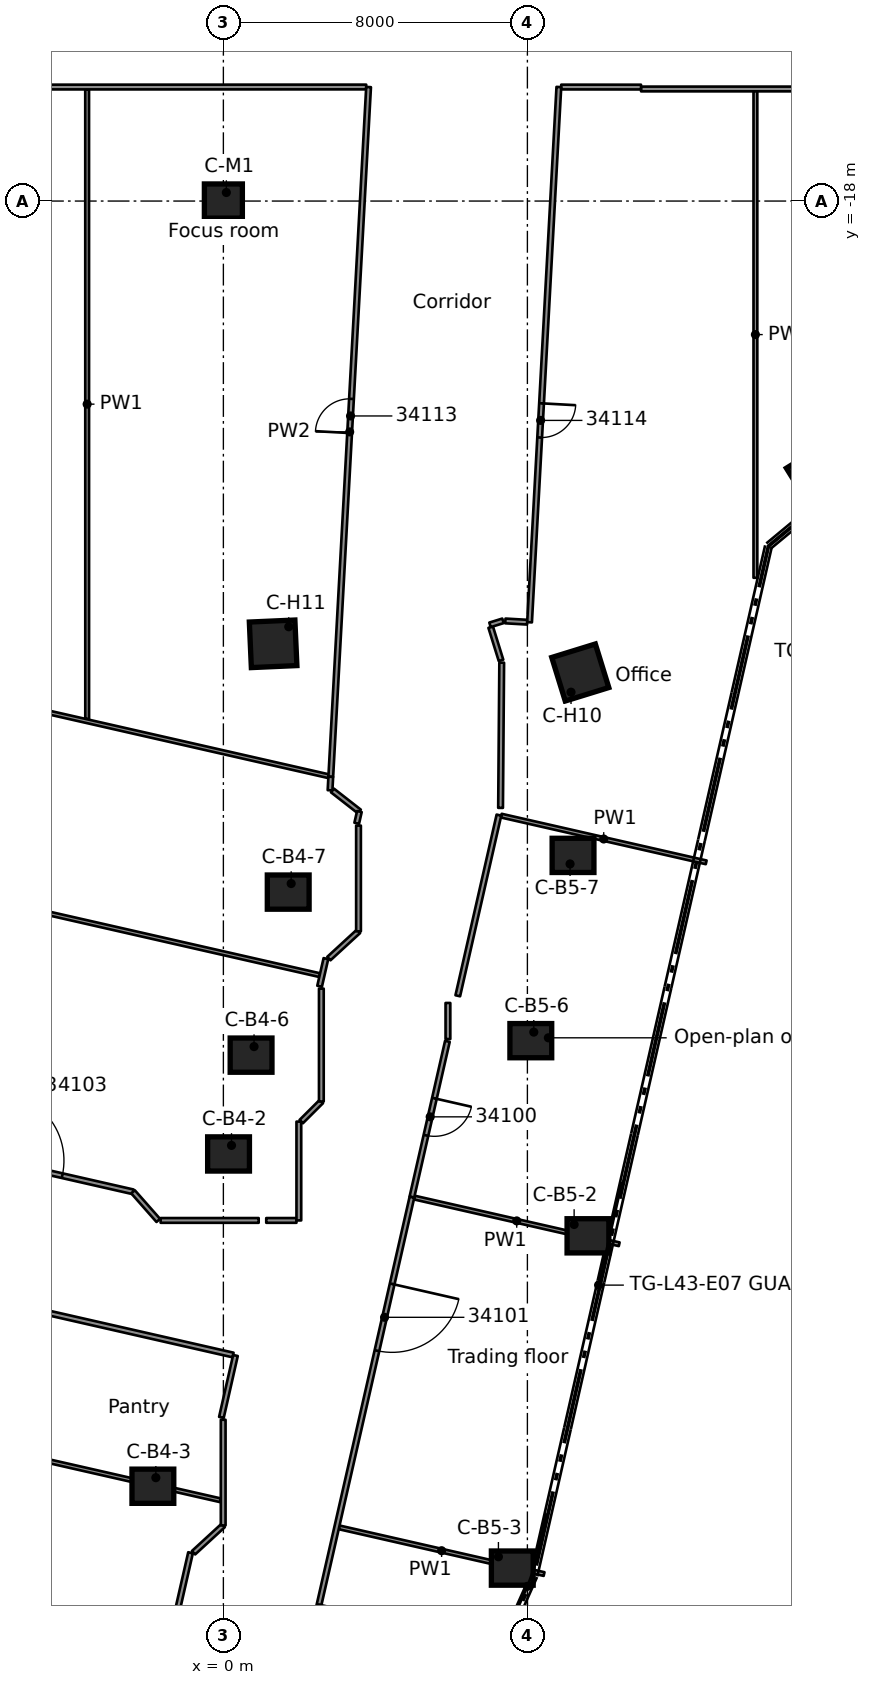
"""IFC4 building model, lengths in metres.
Left out: names, types, materials, properties, quantities, classifications, styles, units other than length and angle.
Written with IfcOpenShell. Run it as: python <this file> out.ifc"""

import sys

from ifc_helpers import new_model, si_unit, direction, frame, frame_2d, origin, origin_2d, place, context, subcontext, project, spatial, rectangle, extrude, element, fill, save


model = new_model("IFC4")
c1 = context("Model", 3, precision=1e-05, world=origin(), true_north=direction((0.0, 1.0)))
c2 = subcontext(c1, "Body", "Model", "MODEL_VIEW")
j1 = project(units=[si_unit("LENGTHUNIT", "METRE"), si_unit("PLANEANGLEUNIT", "RADIAN")], contexts=[c1])
p1 = place(None, origin())
s1 = spatial("IfcSite", under=j1, at=p1, CompositionType="ELEMENT")
p2 = place(p1, origin())
s2 = spatial("IfcBuilding", under=s1, at=p2, CompositionType="ELEMENT")
p3 = place(p2, frame((0.0, 0.0, 167.1)))
s3 = spatial("IfcBuildingStorey", under=s2, at=p3, CompositionType="ELEMENT", Elevation=167.1)
for number, where, z_axis, x_axis in (
    (1, (0.136, -43.073, 0.0), (0.0, 0.0, 1.0), (1.0, 0.0, 0.0)),
    (2, (-1.855, -51.816, 0.0), (0.0, 0.0, 1.0), (1.0, 0.0, 0.0)),
    (3, (0.729, -40.473, 0.0), (0.0, 0.0, 1.0), (1.0, 0.0, 0.0)),
    (4, (1.706, -36.183, 0.0), (0.0, 0.0, 1.0), (1.0, 0.0, 0.0)),
    (5, (9.594, -45.227, 0.0), (0.0, 0.0, 1.0), (1.0, 0.0, 0.0)),
    (6, (7.602, -53.97, 0.0), (0.0, 0.0, 1.0), (1.0, 0.0, 0.0)),
    (7, (8.09, -40.092, 0.0), (0.0, 0.0, 1.0), (1.0, 0.0, 0.0)),
    (8, (9.201, -35.217, 0.0), (0.0, 0.0, 1.0), (1.0, 0.0, 0.0)),
):
    element("IfcColumn", number, at=place(p3, frame(where, z_axis=z_axis, x_axis=x_axis)), inside=s3, PredefinedType="COLUMN", context=c2, shape_type="SweptSolid", body=[
        extrude(rectangle(XDim=1.1, YDim=0.9, at=origin_2d()), origin(), (0.0, 0.0, 1.0), 3.5),
    ])
for number, where, z_axis, x_axis in (
    (9, (15.642, -25.222, 0.0), (0.0, 0.0, 1.0), (0.527, -0.85, 0.0)),
    (10, (9.392, -30.405, 0.0), (0.0, 0.0, 1.0), (0.295, -0.955, 0.0)),
    (11, (1.309, -29.65, 0.0), (0.0, 0.0, 1.0), (0.044, -0.999, 0.0)),
):
    element("IfcColumn", number, at=place(p3, frame(where, z_axis=z_axis, x_axis=x_axis)), inside=s3, PredefinedType="COLUMN", context=c2, shape_type="SweptSolid", body=[
        extrude(rectangle(XDim=1.2, YDim=1.2, at=origin_2d()), origin(), (0.0, 0.0, 1.0), 3.5),
    ])
p4 = place(p3, frame((0.0, -18.0, 0.0), z_axis=(0.0, 0.0, 1.0), x_axis=(1.0, 0.0, 0.0)))
e12 = element("IfcColumn", 12, at=p4, inside=s3, PredefinedType="COLUMN", context=c2, shape_type="SweptSolid", body=[
    extrude(rectangle(XDim=1.0, YDim=0.9, at=origin_2d()), origin(), (0.0, 0.0, 1.0), 3.5),
])
p5 = place(p3, frame((-3.585, -15.062, 0.0), z_axis=(0.0, 0.0, 1.0), x_axis=(5.895705e-05, -0.999999998262, 0.0)))
e13 = element("IfcWall", 13, at=p5, inside=s3, PredefinedType="PARTITIONING", context=c2, shape_type="SweptSolid", body=[
    extrude(rectangle(XDim=16.564, YDim=0.1, at=frame_2d((8.282, 0.0))), origin(), (0.0, 0.0, 1.0), 3.06),
])
p6 = place(p3, frame((7.034, -29.211, 0.0), z_axis=(0.0, 0.0, 1.0), x_axis=(0.29681821376, -0.954934001898, 0.0)))
e14 = element("IfcWall", 14, at=p6, inside=s3, PredefinedType="PARTITIONING", context=c2, shape_type="SweptSolid", body=[
    extrude(rectangle(XDim=0.916, YDim=0.125, at=frame_2d((0.458, 0.0))), origin(), (0.0, 0.0, 1.0), 3.06),
])
p7 = place(p3, frame((-23.487, -46.854, 0.0), z_axis=(0.0, 0.0, 1.0), x_axis=(0.975033161008, -0.222059304997, 0.0)))
e15 = element("IfcWall", 15, at=p7, inside=s3, PredefinedType="PARTITIONING", context=c2, shape_type="SweptSolid", body=[
    extrude(rectangle(XDim=24.007, YDim=0.1, at=frame_2d((12.004, 0.0))), origin(), (0.0, 0.0, 1.0), 3.06),
])
p8 = place(p3, frame((3.046, -52.898, 0.0), z_axis=(0.0, 0.0, 1.0), x_axis=(0.975003485187, -0.222189567426, 0.0)))
e16 = element("IfcWall", 16, at=p8, inside=s3, PredefinedType="PARTITIONING", context=c2, shape_type="SweptSolid", body=[
    extrude(rectangle(XDim=5.531, YDim=0.1, at=frame_2d((2.766, 0.0))), origin(), (0.0, 0.0, 1.0), 3.06),
])
p9 = place(p3, frame((0.255, -48.363, 0.0), z_axis=(0.0, 0.0, 1.0), x_axis=(-0.975011387461, 0.222154888135, 0.0)))
e17 = element("IfcWall", 17, at=p9, inside=s3, PredefinedType="PARTITIONING", context=c2, shape_type="SweptSolid", body=[
    extrude(rectangle(XDim=23.484, YDim=0.125, at=frame_2d((11.742, 0.0))), origin(), (0.0, 0.0, 1.0), 3.06),
])
p10 = place(p9, frame((6.036, 0.0, 0.0)))
e18 = element("IfcOpeningElement", 18, at=p10, cuts=e17, PredefinedType="OPENING", context=c2, shape_type="SweptSolid", body=[
    extrude(rectangle(XDim=0.9, YDim=2.1, at=frame_2d((0.45, 1.05))), frame((0.0, 0.073, 0.0), z_axis=(0.0, -1.0, 0.0), x_axis=(1.0, 0.0, 0.0)), (0.0, 0.0, 1.0), 0.145),
])
p11 = place(p9, frame((15.494, 0.0, 0.0)))
e19 = element("IfcOpeningElement", 19, at=p11, cuts=e17, PredefinedType="OPENING", context=c2, shape_type="SweptSolid", body=[
    extrude(rectangle(XDim=1.1, YDim=2.1, at=frame_2d((0.55, 1.05))), frame((0.0, 0.073, 0.0), z_axis=(0.0, -1.0, 0.0), x_axis=(1.0, 0.0, 0.0)), (0.0, 0.0, 1.0), 0.145),
])
p12 = place(p3, frame((-8.469, -42.682, 0.0), z_axis=(0.0, 0.0, 1.0), x_axis=(0.975041034041, -0.222024732714, 0.0)))
e20 = element("IfcWall", 20, at=p12, inside=s3, PredefinedType="PARTITIONING", context=c2, shape_type="SweptSolid", body=[
    extrude(rectangle(XDim=6.248, YDim=0.125, at=frame_2d((3.124, 0.0))), origin(), (0.0, 0.0, 1.0), 3.06),
])
p13 = place(p12, frame((2.538, 0.0, 0.0)))
e21 = element("IfcOpeningElement", 21, at=p13, cuts=e20, PredefinedType="OPENING", context=c2, shape_type="SweptSolid", body=[
    extrude(rectangle(XDim=1.8, YDim=2.1, at=frame_2d((0.9, 1.05))), frame((0.0, 0.073, 0.0), z_axis=(0.0, -1.0, 0.0), x_axis=(1.0, 0.0, 0.0)), (0.0, 0.0, 1.0), 0.145),
])
p14 = place(p3, frame((5.022, -44.22, 0.0), z_axis=(0.0, 0.0, 1.0), x_axis=(0.975012198948, -0.222151326582, 0.0)))
e22 = element("IfcWall", 22, at=p14, inside=s3, PredefinedType="PARTITIONING", context=c2, shape_type="SweptSolid", body=[
    extrude(rectangle(XDim=5.532, YDim=0.1, at=frame_2d((2.766, 0.0))), origin(), (0.0, 0.0, 1.0), 3.06),
])
p15 = place(p3, frame((-20.366, -33.152, 0.0), z_axis=(0.0, 0.0, 1.0), x_axis=(0.975030849226, -0.222069455479, 0.0)))
e23 = element("IfcWall", 23, at=p15, inside=s3, PredefinedType="PARTITIONING", context=c2, shape_type="SweptSolid", body=[
    extrude(rectangle(XDim=23.487, YDim=0.1, at=frame_2d((11.744, 0.0))), origin(), (0.0, 0.0, 1.0), 3.06),
])
p16 = place(p3, frame((-19.221, -28.127, 0.0), z_axis=(0.0, 0.0, 1.0), x_axis=(0.975047400712, -0.22199677107, 0.0)))
e24 = element("IfcWall", 24, at=p16, inside=s3, PredefinedType="PARTITIONING", context=c2, shape_type="SweptSolid", body=[
    extrude(rectangle(XDim=22.555, YDim=0.1, at=frame_2d((11.277, 0.0))), origin(), (0.0, 0.0, 1.0), 3.06),
])
p17 = place(p3, frame((7.312, -34.171, 0.0), z_axis=(0.0, 0.0, 1.0), x_axis=(0.975003485187, -0.222189567426, 0.0)))
e25 = element("IfcWall", 25, at=p17, inside=s3, PredefinedType="PARTITIONING", context=c2, shape_type="SweptSolid", body=[
    extrude(rectangle(XDim=5.531, YDim=0.1, at=frame_2d((2.766, 0.0))), origin(), (0.0, 0.0, 1.0), 3.06),
])
p18 = place(p3, frame((7.42, -29.048, 0.0), z_axis=(0.0, 0.0, 1.0), x_axis=(0.998362357427, -0.057206671584, 0.0)))
e26 = element("IfcWall", 26, at=p18, inside=s3, PredefinedType="PARTITIONING", context=c2, shape_type="SweptSolid", body=[
    extrude(rectangle(XDim=0.576, YDim=0.125, at=frame_2d((0.288, 0.0))), origin(), (0.0, 0.0, 1.0), 3.06),
])
p19 = place(p3, frame((2.869, -33.508, 0.0), z_axis=(0.0, 0.0, 1.0), x_axis=(0.787979198173, -0.615701862306, 0.0)))
e27 = element("IfcWall", 27, at=p19, inside=s3, PredefinedType="PARTITIONING", context=c2, shape_type="SweptSolid", body=[
    extrude(rectangle(XDim=0.901, YDim=0.125, at=frame_2d((0.451, 0.0))), origin(), (0.0, 0.0, 1.0), 3.06),
])
p20 = place(p3, frame((-0.785, -53.565, 0.0), z_axis=(0.0, 0.0, 1.0), x_axis=(0.736206501859, 0.676756962742, 0.0)))
e28 = element("IfcWall", 28, at=p20, inside=s3, PredefinedType="PARTITIONING", context=c2, shape_type="SweptSolid", body=[
    extrude(rectangle(XDim=1.06, YDim=0.125, at=frame_2d((0.53, 0.0))), origin(), (0.0, 0.0, 1.0), 3.06),
])
p21 = place(p3, frame((-1.651, -44.822, 0.0), z_axis=(0.0, 0.0, 1.0), x_axis=(1.0, 0.0, 0.0)))
e29 = element("IfcWall", 29, at=p21, inside=s3, PredefinedType="PARTITIONING", context=c2, shape_type="SweptSolid", body=[
    extrude(rectangle(XDim=2.58, YDim=0.125, at=frame_2d((1.29, 0.0))), origin(), (0.0, 0.0, 1.0), 3.06),
])
p22 = place(p3, frame((1.128, -44.822, 0.0), z_axis=(0.0, 0.0, 1.0), x_axis=(1.0, 0.0, 0.0)))
e30 = element("IfcWall", 30, at=p22, inside=s3, PredefinedType="PARTITIONING", context=c2, shape_type="SweptSolid", body=[
    extrude(rectangle(XDim=0.795, YDim=0.125, at=frame_2d((0.397, 0.0))), origin(), (0.0, 0.0, 1.0), 3.06),
])
p23 = place(p3, frame((2.048, -42.222, 0.0), z_axis=(0.0, 0.0, 1.0), x_axis=(0.707758792556, 0.706454168053, 0.0)))
e31 = element("IfcWall", 31, at=p23, inside=s3, PredefinedType="PARTITIONING", context=c2, shape_type="SweptSolid", body=[
    extrude(rectangle(XDim=0.749, YDim=0.125, at=frame_2d((0.374, 0.0))), origin(), (0.0, 0.0, 1.0), 3.06),
])
p24 = place(p3, frame((2.776, -37.932, 0.0), z_axis=(0.0, 0.0, 1.0), x_axis=(0.736321314263, 0.676632043404, 0.0)))
e32 = element("IfcWall", 32, at=p24, inside=s3, PredefinedType="PARTITIONING", context=c2, shape_type="SweptSolid", body=[
    extrude(rectangle(XDim=1.059, YDim=0.125, at=frame_2d((0.53, 0.0))), origin(), (0.0, 0.0, 1.0), 3.06),
])
p25 = place(p3, frame((21.988, -15.051, 0.0), z_axis=(0.0, 0.0, 1.0), x_axis=(-1.0, 0.0, 0.0)))
e33 = element("IfcWall", 33, at=p25, inside=s3, PredefinedType="PARTITIONING", context=c2, shape_type="SweptSolid", body=[
    extrude(rectangle(XDim=10.997, YDim=0.125, at=frame_2d((5.499, 0.0))), origin(), (0.0, 0.0, 1.0), 3.06),
])
p26 = place(p25, frame((3.538, 0.0, 0.0)))
e34 = element("IfcOpeningElement", 34, at=p26, cuts=e33, PredefinedType="OPENING", context=c2, shape_type="SweptSolid", body=[
    extrude(rectangle(XDim=0.9, YDim=2.1, at=frame_2d((0.45, 1.05))), frame((0.0, 0.073, 0.0), z_axis=(0.0, -1.0, 0.0), x_axis=(1.0, 0.0, 0.0)), (0.0, 0.0, 1.0), 0.145),
])
p27 = place(p3, frame((-10.99, -15.001, 0.0), z_axis=(0.0, 0.0, 1.0), x_axis=(0.999999991232, 0.000132424021, 0.0)))
e35 = element("IfcWall", 35, at=p27, inside=s3, PredefinedType="PARTITIONING", context=c2, shape_type="SweptSolid", body=[
    extrude(rectangle(XDim=14.749, YDim=0.125, at=frame_2d((7.375, 0.0))), origin(), (0.0, 0.0, 1.0), 3.06),
])
p28 = place(p3, frame((8.89, -15.0, 0.0), z_axis=(0.0, 0.0, 1.0), x_axis=(0.999999891884, -0.000465008087, 0.0)))
e36 = element("IfcWall", 36, at=p28, inside=s3, PredefinedType="PARTITIONING", context=c2, shape_type="SweptSolid", body=[
    extrude(rectangle(XDim=2.1, YDim=0.125, at=frame_2d((1.05, 0.0))), origin(), (0.0, 0.0, 1.0), 3.06),
])
p29 = place(p3, frame((7.016, -29.151, 0.0), z_axis=(0.0, 0.0, 1.0), x_axis=(0.955157326174, 0.296098771114, 0.0)))
e37 = element("IfcWall", 37, at=p29, inside=s3, PredefinedType="PARTITIONING", context=c2, shape_type="SweptSolid", body=[
    extrude(rectangle(XDim=0.358, YDim=0.125, at=frame_2d((0.179, 0.0))), origin(), (0.0, 0.0, 1.0), 3.06),
])
p30 = place(p3, frame((2.532, -38.661, 0.0), z_axis=(0.0, 0.0, 1.0), x_axis=(0.222398515533, 0.974955845302, 0.0)))
e38 = element("IfcWall", 38, at=p30, inside=s3, PredefinedType="PARTITIONING", context=c2, shape_type="SweptSolid", body=[
    extrude(rectangle(XDim=0.747, YDim=0.125, at=frame_2d((0.373, 0.0))), origin(), (0.0, 0.0, 1.0), 3.06),
])
p31 = place(p3, frame((5.895, -40.11, 0.0), z_axis=(0.0, 0.0, 1.0), x_axis=(-0.22234192338, -0.974968752888, 0.0)))
e39 = element("IfcWall", 39, at=p31, inside=s3, PredefinedType="PARTITIONING", context=c2, shape_type="SweptSolid", body=[
    extrude(rectangle(XDim=4.201, YDim=0.125, at=frame_2d((2.101, 0.0))), origin(), (0.0, 0.0, 1.0), 3.06),
])
p32 = place(p31, frame((1.538, 0.0, 0.0)))
e40 = element("IfcOpeningElement", 40, at=p32, cuts=e39, PredefinedType="OPENING", context=c2, shape_type="SweptSolid", body=[
    extrude(rectangle(XDim=1.0, YDim=2.1, at=frame_2d((0.5, 1.05))), frame((0.0, 0.073, 0.0), z_axis=(0.0, -1.0, 0.0), x_axis=(1.0, 0.0, 0.0)), (0.0, 0.0, 1.0), 0.145),
])
p33 = place(p3, frame((4.962, -44.211, 0.0), z_axis=(0.0, 0.0, 1.0), x_axis=(-0.222229868657, -0.974994300228, 0.0)))
e41 = element("IfcWall", 41, at=p33, inside=s3, PredefinedType="PARTITIONING", context=c2, shape_type="SweptSolid", body=[
    extrude(rectangle(XDim=13.918, YDim=0.125, at=frame_2d((6.959, 0.0))), origin(), (0.0, 0.0, 1.0), 3.06),
])
p34 = place(p33, frame((2.341, 0.0, 0.0)))
e42 = element("IfcOpeningElement", 42, at=p34, cuts=e41, PredefinedType="OPENING", context=c2, shape_type="SweptSolid", body=[
    extrude(rectangle(XDim=1.8, YDim=2.1, at=frame_2d((0.9, 1.05))), frame((0.0, 0.073, 0.0), z_axis=(0.0, -1.0, 0.0), x_axis=(1.0, 0.0, 0.0)), (0.0, 0.0, 1.0), 0.145),
])
p35 = place(p33, frame((10.995, 0.0, 0.0)))
e43 = element("IfcOpeningElement", 43, at=p35, cuts=e41, PredefinedType="OPENING", context=c2, shape_type="SweptSolid", body=[
    extrude(rectangle(XDim=0.9, YDim=2.1, at=frame_2d((0.45, 1.05))), frame((0.0, 0.073, 0.0), z_axis=(0.0, -1.0, 0.0), x_axis=(1.0, 0.0, 0.0)), (0.0, 0.0, 1.0), 0.145),
])
p36 = place(p3, frame((7.251, -34.157, 0.0), z_axis=(0.0, 0.0, 1.0), x_axis=(-0.222123179998, -0.97501861157, 0.0)))
e44 = element("IfcWall", 44, at=p36, inside=s3, PredefinedType="PARTITIONING", context=c2, shape_type="SweptSolid", body=[
    extrude(rectangle(XDim=4.876, YDim=0.125, at=frame_2d((2.438, 0.0))), origin(), (0.0, 0.0, 1.0), 3.06),
])
p37 = place(p3, frame((-1.77, -57.544, 0.0), z_axis=(0.0, 0.0, 1.0), x_axis=(0.22206594154, 0.975031649542, 0.0)))
e45 = element("IfcWall", 45, at=p37, inside=s3, PredefinedType="PARTITIONING", context=c2, shape_type="SweptSolid", body=[
    extrude(rectangle(XDim=4.08, YDim=0.125, at=frame_2d((2.04, 0.0))), origin(), (0.0, 0.0, 1.0), 3.06),
])
p38 = place(p3, frame((3.509, -34.372, 0.0), z_axis=(0.0, 0.0, 1.0), x_axis=(0.221088338472, 0.975253785736, 0.0)))
e46 = element("IfcWall", 46, at=p38, inside=s3, PredefinedType="PARTITIONING", context=c2, shape_type="SweptSolid", body=[
    extrude(rectangle(XDim=0.317, YDim=0.125, at=frame_2d((0.158, 0.0))), origin(), (0.0, 0.0, 1.0), 3.06),
])
p39 = place(p3, frame((-0.052, -50.005, 0.0), z_axis=(0.0, 0.0, 1.0), x_axis=(0.22157056649, 0.975144340119, 0.0)))
e47 = element("IfcWall", 47, at=p39, inside=s3, PredefinedType="PARTITIONING", context=c2, shape_type="SweptSolid", body=[
    extrude(rectangle(XDim=1.67, YDim=0.125, at=frame_2d((0.835, 0.0))), origin(), (0.0, 0.0, 1.0), 3.06),
])
p40 = place(p3, frame((8.828, -14.999, 0.0), z_axis=(0.0, 0.0, 1.0), x_axis=(-0.054660912328, -0.998504974782, 0.0)))
e48 = element("IfcWall", 48, at=p40, inside=s3, PredefinedType="PARTITIONING", context=c2, shape_type="SweptSolid", body=[
    extrude(rectangle(XDim=14.105, YDim=0.125, at=frame_2d((7.052, 0.0))), origin(), (0.0, 0.0, 1.0), 3.06),
])
p41 = place(p40, frame((8.336, 0.0, 0.0)))
e49 = element("IfcOpeningElement", 49, at=p41, cuts=e48, PredefinedType="OPENING", context=c2, shape_type="SweptSolid", body=[
    extrude(rectangle(XDim=0.9, YDim=2.1, at=frame_2d((0.45, 1.05))), frame((0.0, 0.073, 0.0), z_axis=(0.0, -1.0, 0.0), x_axis=(1.0, 0.0, 0.0)), (0.0, 0.0, 1.0), 0.145),
])
p42 = place(p3, frame((2.826, -33.149, 0.0), z_axis=(0.0, 0.0, 1.0), x_axis=(0.054748402429, 0.998500181488, 0.0)))
e50 = element("IfcWall", 50, at=p42, inside=s3, PredefinedType="PARTITIONING", context=c2, shape_type="SweptSolid", body=[
    extrude(rectangle(XDim=18.176, YDim=0.125, at=frame_2d((9.088, 0.0))), origin(), (0.0, 0.0, 1.0), 3.06),
])
p43 = place(p42, frame((9.059, 0.0, 0.0)))
e51 = element("IfcOpeningElement", 51, at=p43, cuts=e50, PredefinedType="OPENING", context=c2, shape_type="SweptSolid", body=[
    extrude(rectangle(XDim=0.9, YDim=2.1, at=frame_2d((0.45, 1.05))), frame((0.0, 0.073, 0.0), z_axis=(0.0, -1.0, 0.0), x_axis=(1.0, 0.0, 0.0)), (0.0, 0.0, 1.0), 0.145),
])
p44 = place(p3, frame((2.807, -33.504, 0.0), z_axis=(0.0, 0.0, 1.0), x_axis=(0.053568093203, 0.998564198933, 0.0)))
e52 = element("IfcWall", 52, at=p44, inside=s3, PredefinedType="PARTITIONING", context=c2, shape_type="SweptSolid", body=[
    extrude(rectangle(XDim=0.355, YDim=0.125, at=frame_2d((0.178, 0.0))), origin(), (0.0, 0.0, 1.0), 3.06),
])
p45 = place(p3, frame((7.294, -33.967, 0.0), z_axis=(0.0, 0.0, 1.0), x_axis=(0.00785868007, 0.999969120097, 0.0)))
e53 = element("IfcWall", 53, at=p45, inside=s3, PredefinedType="PARTITIONING", context=c2, shape_type="SweptSolid", body=[
    extrude(rectangle(XDim=3.821, YDim=0.125, at=frame_2d((1.911, 0.0))), origin(), (0.0, 0.0, 1.0), 3.06),
])
p46 = place(p3, frame((14.0, -27.913, 0.0), z_axis=(0.0, 0.0, 1.0), x_axis=(0.0, 1.0, 0.0)))
e54 = element("IfcWall", 54, at=p46, inside=s3, PredefinedType="PARTITIONING", context=c2, shape_type="SweptSolid", body=[
    extrude(rectangle(XDim=12.799, YDim=0.1, at=frame_2d((6.399, 0.0))), origin(), (0.0, 0.0, 1.0), 3.06),
])
p47 = place(p3, frame((5.909, -40.049, 0.0), z_axis=(0.0, 0.0, 1.0), x_axis=(0.0, 1.0, 0.0)))
e55 = element("IfcWall", 55, at=p47, inside=s3, PredefinedType="PARTITIONING", context=c2, shape_type="SweptSolid", body=[
    extrude(rectangle(XDim=0.949, YDim=0.125, at=frame_2d((0.475, 0.0))), origin(), (0.0, 0.0, 1.0), 3.06),
])
p48 = place(p3, frame((3.556, -37.215, 0.0), z_axis=(0.0, 0.0, 1.0), x_axis=(0.0, 1.0, 0.0)))
e56 = element("IfcWall", 56, at=p48, inside=s3, PredefinedType="PARTITIONING", context=c2, shape_type="SweptSolid", body=[
    extrude(rectangle(XDim=2.782, YDim=0.125, at=frame_2d((1.391, 0.0))), origin(), (0.0, 0.0, 1.0), 3.06),
])
p49 = place(p3, frame((2.578, -41.693, 0.0), z_axis=(0.0, 0.0, 1.0), x_axis=(0.0, 1.0, 0.0)))
e57 = element("IfcWall", 57, at=p49, inside=s3, PredefinedType="PARTITIONING", context=c2, shape_type="SweptSolid", body=[
    extrude(rectangle(XDim=2.97, YDim=0.125, at=frame_2d((1.485, 0.0))), origin(), (0.0, 0.0, 1.0), 3.06),
])
p50 = place(p3, frame((1.986, -44.822, 0.0), z_axis=(0.0, 0.0, 1.0), x_axis=(0.0, 1.0, 0.0)))
e58 = element("IfcWall", 58, at=p50, inside=s3, PredefinedType="PARTITIONING", context=c2, shape_type="SweptSolid", body=[
    extrude(rectangle(XDim=2.6, YDim=0.125, at=frame_2d((1.3, 0.0))), origin(), (0.0, 0.0, 1.0), 3.06),
])
p51 = place(p3, frame((-0.005, -52.848, 0.0), z_axis=(0.0, 0.0, 1.0), x_axis=(0.0, 1.0, 0.0)))
e59 = element("IfcWall", 59, at=p51, inside=s3, PredefinedType="PARTITIONING", context=c2, shape_type="SweptSolid", body=[
    extrude(rectangle(XDim=2.781, YDim=0.125, at=frame_2d((1.391, 0.0))), origin(), (0.0, 0.0, 1.0), 3.06),
])
p52 = place(p3, frame((-1.713, -44.822, 0.0), z_axis=(0.0, 0.0, 1.0), x_axis=(-0.661460760782, 0.749979774358, 0.0)))
e60 = element("IfcWall", 60, at=p52, inside=s3, PredefinedType="PARTITIONING", context=c2, shape_type="SweptSolid", body=[
    extrude(rectangle(XDim=1.004, YDim=0.125, at=frame_2d((0.502, 0.0))), origin(), (0.0, 0.0, 1.0), 3.06),
])
p53 = place(p32, origin())
e61 = element("IfcDoor", 61, at=p53, inside=s3, OperationType="SINGLE_SWING_LEFT", PredefinedType="DOOR", context=c2, shape_type="SweptSolid", body=[
    extrude(rectangle(XDim=1.0, YDim=2.1, at=frame_2d((0.5, 1.05))), frame((0.0, 0.025, 0.0), z_axis=(0.0, -1.0, 0.0), x_axis=(1.0, 0.0, 0.0)), (0.0, 0.0, 1.0), 0.05),
])
fill(e40, e61)
p54 = place(p34, origin())
e62 = element("IfcDoor", 62, at=p54, inside=s3, OperationType="DOUBLE_DOOR_SINGLE_SWING", PredefinedType="DOOR", context=c2, shape_type="SweptSolid", body=[
    extrude(rectangle(XDim=1.8, YDim=2.1, at=frame_2d((0.9, 1.05))), frame((0.0, 0.025, 0.0), z_axis=(0.0, -1.0, 0.0), x_axis=(1.0, 0.0, 0.0)), (0.0, 0.0, 1.0), 0.05),
])
fill(e42, e62)
p55 = place(p13, origin())
e63 = element("IfcDoor", 63, at=p55, inside=s3, OperationType="DOUBLE_DOOR_SINGLE_SWING", PredefinedType="DOOR", context=c2, shape_type="SweptSolid", body=[
    extrude(rectangle(XDim=1.8, YDim=2.1, at=frame_2d((0.9, 1.05))), frame((0.0, 0.025, 0.0), z_axis=(0.0, -1.0, 0.0), x_axis=(1.0, 0.0, 0.0)), (0.0, 0.0, 1.0), 0.05),
])
fill(e21, e63)
p56 = place(p35, origin())
e64 = element("IfcDoor", 64, at=p56, inside=s3, OperationType="SINGLE_SWING_RIGHT", PredefinedType="DOOR", context=c2, shape_type="SweptSolid", body=[
    extrude(rectangle(XDim=0.9, YDim=2.1, at=frame_2d((0.45, 1.05))), frame((0.0, 0.025, 0.0), z_axis=(0.0, -1.0, 0.0), x_axis=(1.0, 0.0, 0.0)), (0.0, 0.0, 1.0), 0.05),
])
fill(e43, e64)
p57 = place(p43, origin())
e65 = element("IfcDoor", 65, at=p57, inside=s3, OperationType="SINGLE_SWING_RIGHT", PredefinedType="DOOR", context=c2, shape_type="SweptSolid", body=[
    extrude(rectangle(XDim=0.9, YDim=2.1, at=frame_2d((0.45, 1.05))), frame((0.0, 0.025, 0.0), z_axis=(0.0, -1.0, 0.0), x_axis=(1.0, 0.0, 0.0)), (0.0, 0.0, 1.0), 0.05),
])
fill(e51, e65)
p58 = place(p41, origin())
e66 = element("IfcDoor", 66, at=p58, inside=s3, OperationType="SINGLE_SWING_RIGHT", PredefinedType="DOOR", context=c2, shape_type="SweptSolid", body=[
    extrude(rectangle(XDim=0.9, YDim=2.1, at=frame_2d((0.45, 1.05))), frame((0.0, 0.025, 0.0), z_axis=(0.0, -1.0, 0.0), x_axis=(1.0, 0.0, 0.0)), (0.0, 0.0, 1.0), 0.05),
])
fill(e49, e66)
save(model, sys.argv[1])
